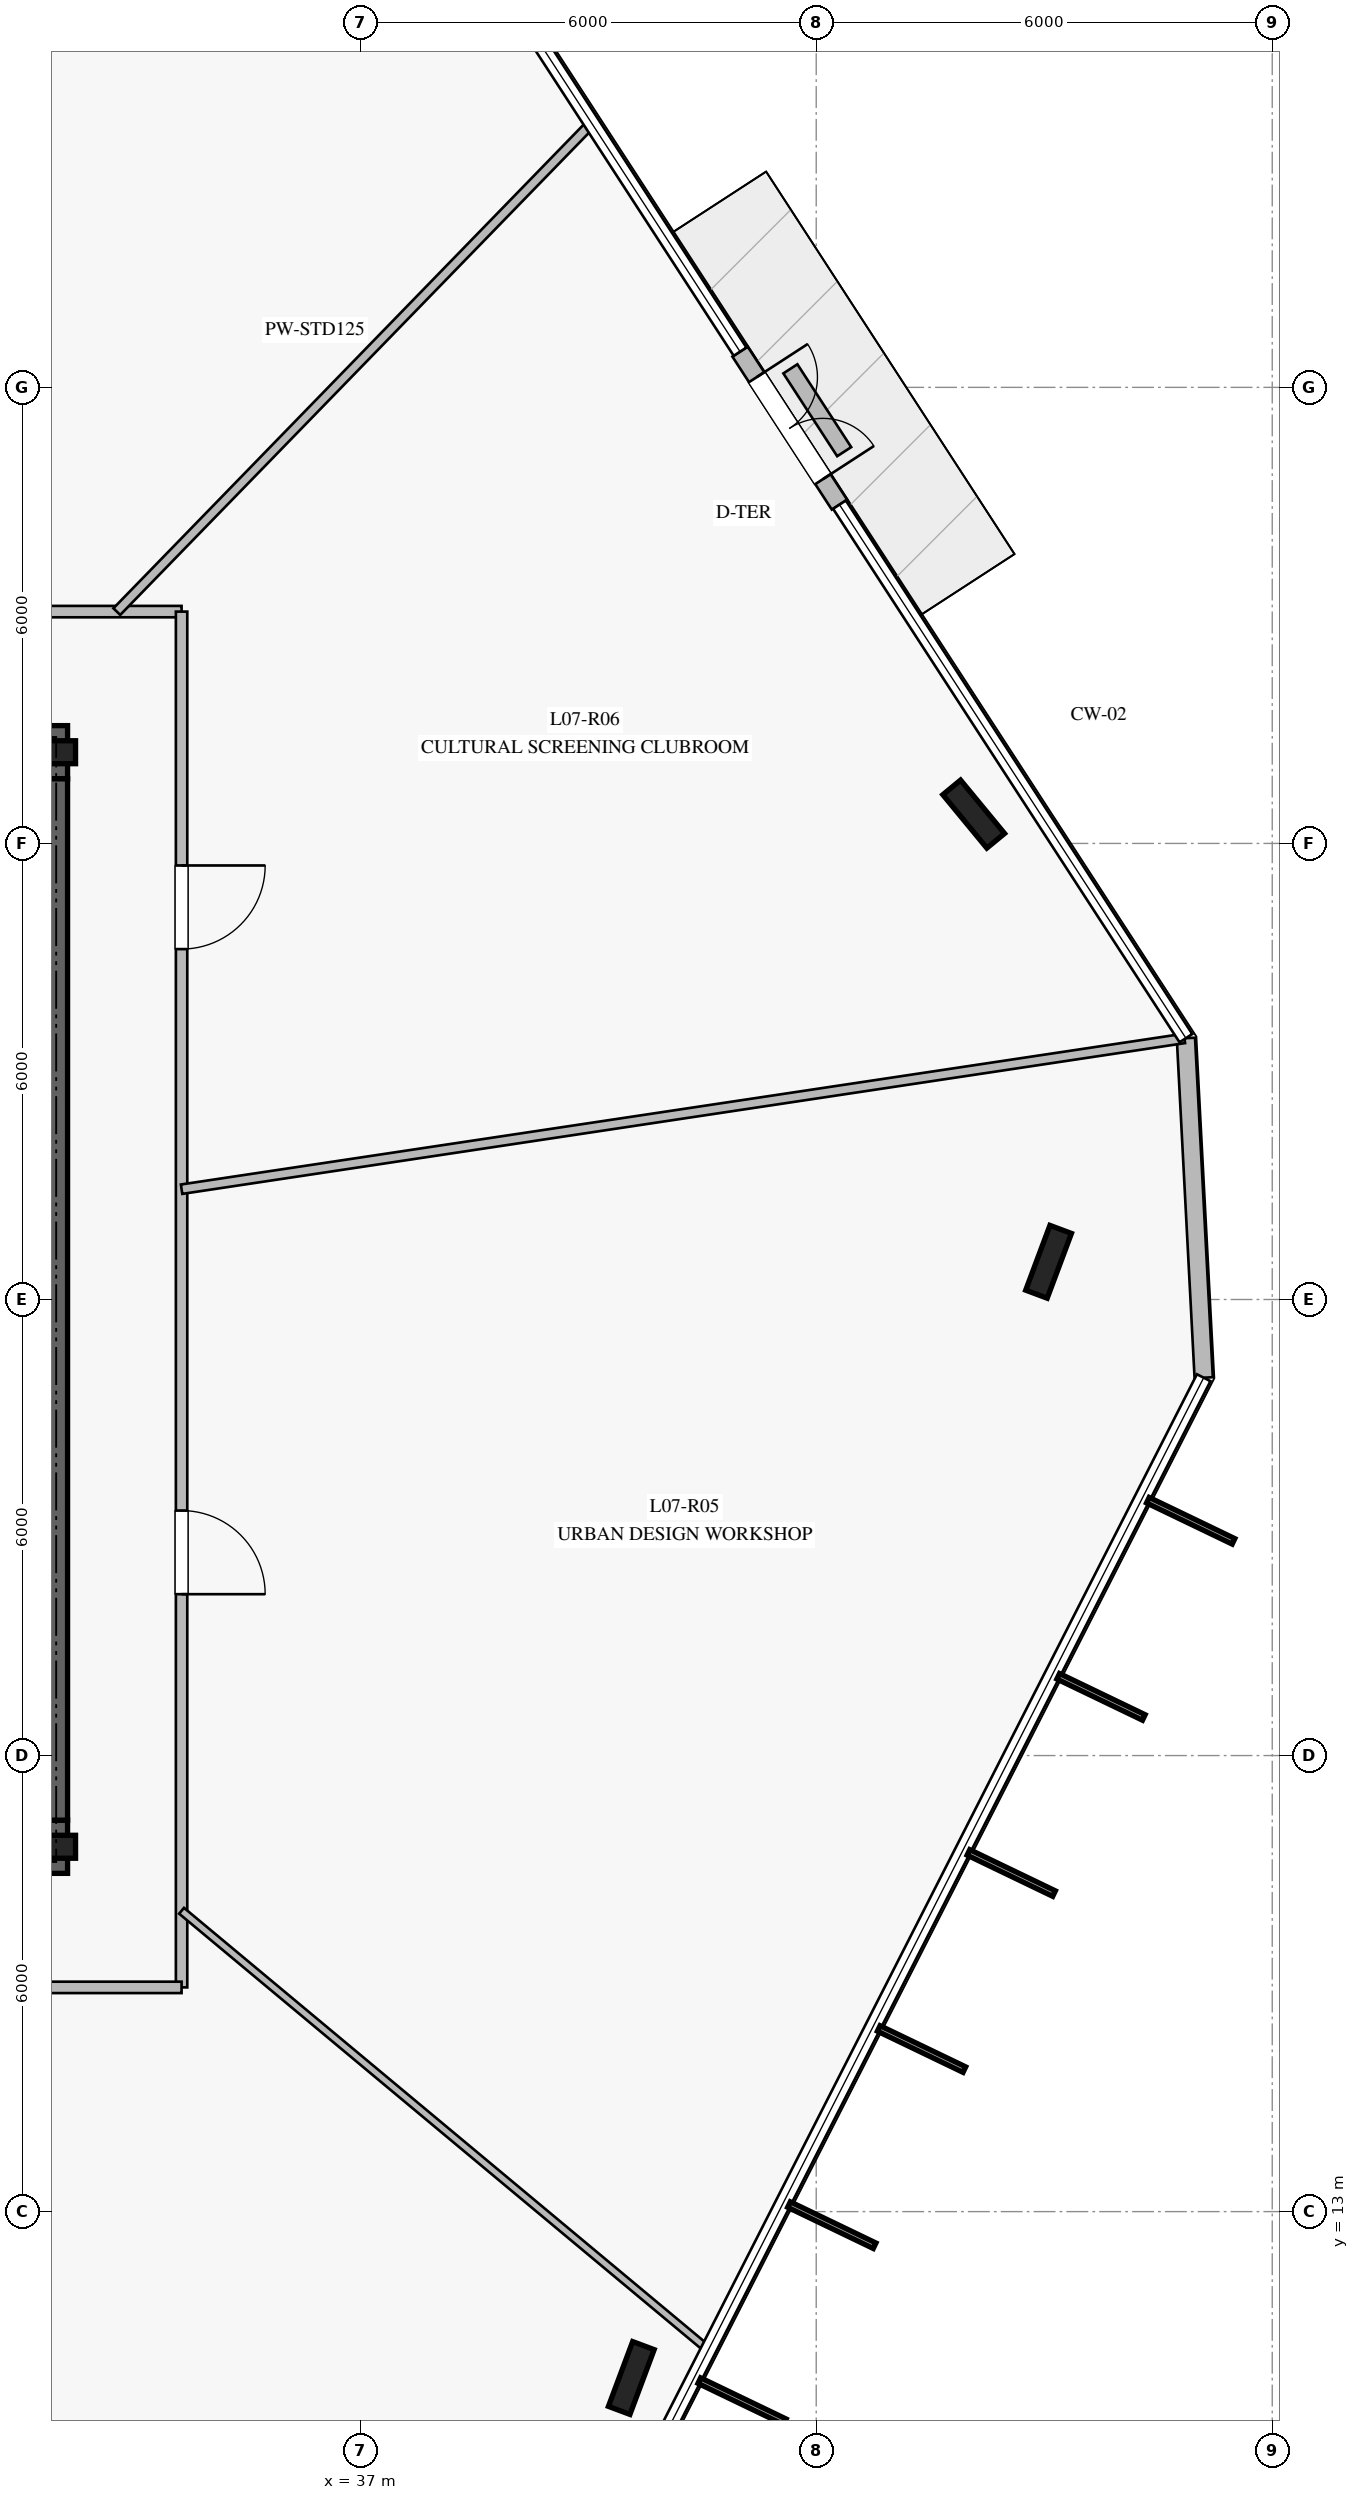
"""IFC4 building model, lengths in metres.
Left out: names, types, materials, properties, quantities, classifications, styles, units other than length and angle.
Written with IfcOpenShell. Run it as: python <this file> out.ifc"""

import sys

from ifc_helpers import new_model, si_unit, direction, frame, frame_2d, origin, origin_2d, place, context, subcontext, project, spatial, rectangle, i_section, extrude, element, fill, save


model = new_model("IFC4")
c1 = context("Model", 3, precision=1e-05, world=origin(), true_north=direction((0.0, 1.0)))
c2 = subcontext(c1, "Body", "Model", "MODEL_VIEW")
j1 = project(units=[si_unit("LENGTHUNIT", "METRE"), si_unit("PLANEANGLEUNIT", "RADIAN")], contexts=[c1])
p1 = place(None, origin())
s1 = spatial("IfcSite", under=j1, at=p1, CompositionType="ELEMENT")
p2 = place(p1, origin())
s2 = spatial("IfcBuilding", under=s1, at=p2, CompositionType="ELEMENT")
p3 = place(p2, frame((0.0, 0.0, 32.0)))
s3 = spatial("IfcBuildingStorey", under=s2, at=p3, CompositionType="ELEMENT", Elevation=32.0)
p4 = place(p3, frame((16.85, 17.8, 0.0), z_axis=(0.0, 0.0, 1.0), x_axis=(1.0, 0.0, 0.0)))
e1 = element("IfcWall", 1, at=p4, inside=s3, PredefinedType="SHEAR", context=c2, shape_type="SweptSolid", body=[
    extrude(rectangle(XDim=16.3, YDim=0.7, at=frame_2d((8.15, 0.0))), origin(), (0.0, 0.0, 1.0), 3.76),
])
p5 = place(p4, frame((5.1, 0.0, 0.0)))
e2 = element("IfcOpeningElement", 2, at=p5, cuts=e1, PredefinedType="OPENING", context=c2, shape_type="SweptSolid", body=[
    extrude(rectangle(XDim=1.2, YDim=2.25, at=frame_2d((0.6, 1.125))), frame((0.0, 0.36, 0.0), z_axis=(0.0, -1.0, 0.0), x_axis=(1.0, 0.0, 0.0)), (0.0, 0.0, 1.0), 0.72),
])
p6 = place(p4, frame((14.05, 0.0, 0.0)))
e3 = element("IfcOpeningElement", 3, at=p6, cuts=e1, PredefinedType="OPENING", context=c2, shape_type="SweptSolid", body=[
    extrude(rectangle(XDim=0.9, YDim=2.1, at=frame_2d((0.45, 1.05))), frame((0.0, 0.36, 0.0), z_axis=(0.0, -1.0, 0.0), x_axis=(1.0, 0.0, 0.0)), (0.0, 0.0, 1.0), 0.72),
])
p7 = place(p4, frame((7.95, 0.0, 0.0)))
e4 = element("IfcOpeningElement", 4, at=p7, cuts=e1, PredefinedType="OPENING", context=c2, shape_type="SweptSolid", body=[
    extrude(rectangle(XDim=1.1, YDim=2.2, at=frame_2d((0.55, 1.1))), frame((0.0, 0.36, 0.0), z_axis=(0.0, -1.0, 0.0), x_axis=(1.0, 0.0, 0.0)), (0.0, 0.0, 1.0), 0.72),
])
p8 = place(p4, frame((9.925, 0.0, 0.0)))
e5 = element("IfcOpeningElement", 5, at=p8, cuts=e1, PredefinedType="OPENING", context=c2, shape_type="SweptSolid", body=[
    extrude(rectangle(XDim=1.1, YDim=2.2, at=frame_2d((0.55, 1.1))), frame((0.0, 0.36, 0.0), z_axis=(0.0, -1.0, 0.0), x_axis=(1.0, 0.0, 0.0)), (0.0, 0.0, 1.0), 0.72),
])
p9 = place(p4, frame((11.9, 0.0, 0.0)))
e6 = element("IfcOpeningElement", 6, at=p9, cuts=e1, PredefinedType="OPENING", context=c2, shape_type="SweptSolid", body=[
    extrude(rectangle(XDim=1.1, YDim=2.2, at=frame_2d((0.55, 1.1))), frame((0.0, 0.36, 0.0), z_axis=(0.0, -1.0, 0.0), x_axis=(1.0, 0.0, 0.0)), (0.0, 0.0, 1.0), 0.72),
])
p10 = place(p3, frame((33.15, 32.2, 0.0), z_axis=(0.0, 0.0, 1.0), x_axis=(-1.0, 0.0, 0.0)))
e7 = element("IfcWall", 7, at=p10, inside=s3, PredefinedType="SHEAR", context=c2, shape_type="SweptSolid", body=[
    extrude(rectangle(XDim=16.3, YDim=0.7, at=frame_2d((8.15, 0.0))), origin(), (0.0, 0.0, 1.0), 3.76),
])
p11 = place(p10, frame((5.1, 0.0, 0.0)))
e8 = element("IfcOpeningElement", 8, at=p11, cuts=e7, PredefinedType="OPENING", context=c2, shape_type="SweptSolid", body=[
    extrude(rectangle(XDim=1.2, YDim=2.25, at=frame_2d((0.6, 1.125))), frame((0.0, 0.36, 0.0), z_axis=(0.0, -1.0, 0.0), x_axis=(1.0, 0.0, 0.0)), (0.0, 0.0, 1.0), 0.72),
])
p12 = place(p3, frame((32.8, 18.15, 0.0), z_axis=(0.0, 0.0, 1.0), x_axis=(0.0, 1.0, 0.0)))
e9 = element("IfcWall", 9, at=p12, inside=s3, PredefinedType="SHEAR", context=c2, shape_type="SweptSolid", body=[
    extrude(rectangle(XDim=13.7, YDim=0.7, at=frame_2d((6.85, 0.0))), origin(), (0.0, 0.0, 1.0), 3.76),
])
for number, where, z_axis, x_axis in (
    (10, (45.072, 31.386, 0.0), (0.0, 0.0, 1.0), (-0.636, 0.772, 0.0)),
    (11, (40.567, 10.811, 0.0), (0.0, 0.0, 1.0), (0.35, 0.937, 0.0)),
    (12, (46.057, 25.496, 0.0), (0.0, 0.0, 1.0), (0.35, 0.937, 0.0)),
):
    element("IfcColumn", number, at=place(p3, frame(where, z_axis=z_axis, x_axis=x_axis)), inside=s3, PredefinedType="COLUMN", context=c2, shape_type="SweptSolid", body=[
        extrude(i_section(OverallWidth=0.302, OverallDepth=0.91, WebThickness=0.021, FlangeThickness=0.04, at=origin_2d()), origin(), (0.0, 0.0, 1.0), 4.0),
    ])
p13 = place(p3, frame((43.306, 35.457, 0.0), z_axis=(0.0, 0.0, 1.0), x_axis=(-0.54482747333, 0.838548164571, 0.0)))
e13 = element("IfcWall", 13, at=p13, inside=s3, PredefinedType="STANDARD", context=c2, shape_type="SweptSolid", body=[
    extrude(rectangle(XDim=2.4, YDim=0.24, at=frame_2d((1.2, 0.0))), origin(), (0.0, 0.0, 1.0), 3.76),
])
p14 = place(p13, frame((0.4, 0.0, 0.0)))
e14 = element("IfcOpeningElement", 14, at=p14, cuts=e13, PredefinedType="OPENING", context=c2, shape_type="SweptSolid", body=[
    extrude(rectangle(XDim=1.6, YDim=2.25, at=frame_2d((0.8, 1.125))), frame((0.0, 0.13, 0.0), z_axis=(0.0, -1.0, 0.0), x_axis=(1.0, 0.0, 0.0)), (0.0, 0.0, 1.0), 0.26),
])
p15 = place(p3, frame((48.098, 23.971, 0.0), z_axis=(0.0, 0.0, 1.0), x_axis=(-0.052286689983, 0.998632115471, 0.0)))
e15 = element("IfcWall", 15, at=p15, inside=s3, PredefinedType="STANDARD", context=c2, shape_type="SweptSolid", body=[
    extrude(rectangle(XDim=4.473, YDim=0.24, at=frame_2d((2.237, 0.0))), origin(), (0.0, 0.0, 1.0), 3.76),
])
p16 = place(p3, frame((43.368, 36.154, 0.0), z_axis=(0.0, 0.0, 1.0), x_axis=(-0.544777038638, 0.8385809312, 0.0)))
e16 = element("IfcWall", 16, at=p16, inside=s3, PredefinedType="USERDEFINED", context=c2, shape_type="SweptSolid", body=[
    extrude(rectangle(XDim=1.3, YDim=0.22, at=frame_2d((0.65, 0.0))), origin(), (0.0, 0.0, 1.0), 0.4),
])
p17 = place(p3, frame((15.35, 34.05, 0.0), z_axis=(0.0, 0.0, 1.0), x_axis=(1.0, 0.0, 0.0)))
e17 = element("IfcWall", 17, at=p17, inside=s3, PredefinedType="PARTITIONING", context=c2, shape_type="SweptSolid", body=[
    extrude(rectangle(XDim=19.3, YDim=0.15, at=frame_2d((9.65, 0.0))), origin(), (0.0, 0.0, 1.0), 3.21),
])
p18 = place(p17, frame((12.519, 0.0, 0.0)))
e18 = element("IfcOpeningElement", 18, at=p18, cuts=e17, PredefinedType="OPENING", context=c2, shape_type="SweptSolid", body=[
    extrude(rectangle(XDim=1.1, YDim=2.2, at=frame_2d((0.55, 1.1))), frame((0.0, 0.085, 0.0), z_axis=(0.0, -1.0, 0.0), x_axis=(1.0, 0.0, 0.0)), (0.0, 0.0, 1.0), 0.17),
])
p19 = place(p17, frame((3.519, 0.0, 0.0)))
e19 = element("IfcOpeningElement", 19, at=p19, cuts=e17, PredefinedType="OPENING", context=c2, shape_type="SweptSolid", body=[
    extrude(rectangle(XDim=1.1, YDim=2.2, at=frame_2d((0.55, 1.1))), frame((0.0, 0.085, 0.0), z_axis=(0.0, -1.0, 0.0), x_axis=(1.0, 0.0, 0.0)), (0.0, 0.0, 1.0), 0.17),
])
p20 = place(p3, frame((34.65, 34.05, 0.0), z_axis=(0.0, 0.0, 1.0), x_axis=(0.0, -1.0, 0.0)))
e20 = element("IfcWall", 20, at=p20, inside=s3, PredefinedType="PARTITIONING", context=c2, shape_type="SweptSolid", body=[
    extrude(rectangle(XDim=18.1, YDim=0.15, at=frame_2d((9.05, 0.0))), origin(), (0.0, 0.0, 1.0), 3.21),
])
p21 = place(p20, frame((11.827, 0.0, 0.0)))
e21 = element("IfcOpeningElement", 21, at=p21, cuts=e20, PredefinedType="OPENING", context=c2, shape_type="SweptSolid", body=[
    extrude(rectangle(XDim=1.1, YDim=2.2, at=frame_2d((0.55, 1.1))), frame((0.0, 0.085, 0.0), z_axis=(0.0, -1.0, 0.0), x_axis=(1.0, 0.0, 0.0)), (0.0, 0.0, 1.0), 0.17),
])
p22 = place(p20, frame((3.34, 0.0, 0.0)))
e22 = element("IfcOpeningElement", 22, at=p22, cuts=e20, PredefinedType="OPENING", context=c2, shape_type="SweptSolid", body=[
    extrude(rectangle(XDim=1.1, YDim=2.2, at=frame_2d((0.55, 1.1))), frame((0.0, 0.085, 0.0), z_axis=(0.0, -1.0, 0.0), x_axis=(1.0, 0.0, 0.0)), (0.0, 0.0, 1.0), 0.17),
])
p23 = place(p3, frame((34.65, 15.95, 0.0), z_axis=(0.0, 0.0, 1.0), x_axis=(-1.0, 0.0, 0.0)))
e23 = element("IfcWall", 23, at=p23, inside=s3, PredefinedType="PARTITIONING", context=c2, shape_type="SweptSolid", body=[
    extrude(rectangle(XDim=19.3, YDim=0.15, at=frame_2d((9.65, 0.0))), origin(), (0.0, 0.0, 1.0), 3.21),
])
p24 = place(p23, frame((14.102, 0.0, 0.0)))
e24 = element("IfcOpeningElement", 24, at=p24, cuts=e23, PredefinedType="OPENING", context=c2, shape_type="SweptSolid", body=[
    extrude(rectangle(XDim=1.1, YDim=2.2, at=frame_2d((0.55, 1.1))), frame((0.0, 0.085, 0.0), z_axis=(0.0, -1.0, 0.0), x_axis=(1.0, 0.0, 0.0)), (0.0, 0.0, 1.0), 0.17),
])
p25 = place(p23, frame((4.818, 0.0, 0.0)))
e25 = element("IfcOpeningElement", 25, at=p25, cuts=e23, PredefinedType="OPENING", context=c2, shape_type="SweptSolid", body=[
    extrude(rectangle(XDim=1.1, YDim=2.2, at=frame_2d((0.55, 1.1))), frame((0.0, 0.085, 0.0), z_axis=(0.0, -1.0, 0.0), x_axis=(1.0, 0.0, 0.0)), (0.0, 0.0, 1.0), 0.17),
])
p26 = place(p3, frame((33.798, 34.05, 0.0), z_axis=(0.0, 0.0, 1.0), x_axis=(0.697087358393, 0.716986202635, 0.0)))
e26 = element("IfcWall", 26, at=p26, inside=s3, PredefinedType="PARTITIONING", context=c2, shape_type="SweptSolid", body=[
    extrude(rectangle(XDim=8.944, YDim=0.125, at=frame_2d((4.472, 0.0))), origin(), (0.0, 0.0, 1.0), 3.05),
])
p27 = place(p3, frame((34.65, 16.958, 0.0), z_axis=(0.0, 0.0, 1.0), x_axis=(0.76818127449, -0.640232402744, 0.0)))
e27 = element("IfcWall", 27, at=p27, inside=s3, PredefinedType="MOVABLE", context=c2, shape_type="SweptSolid", body=[
    extrude(rectangle(XDim=9.004, YDim=0.1, at=frame_2d((4.502, 0.0))), origin(), (0.0, 0.0, 1.0), 3.06),
])
p28 = place(p3, frame((34.65, 26.451, 0.0), z_axis=(0.0, 0.0, 1.0), x_axis=(0.988881121933, 0.148708193067, 0.0)))
e28 = element("IfcWall", 28, at=p28, inside=s3, PredefinedType="PARTITIONING", context=c2, shape_type="SweptSolid", body=[
    extrude(rectangle(XDim=13.343, YDim=0.125, at=frame_2d((6.671, 0.0))), origin(), (0.0, 0.0, 1.0), 3.06),
])
p29 = place(p14, frame((1.6, 0.0, 0.0), z_axis=(0.0, 0.0, 1.0), x_axis=(-1.0, 0.0, 0.0)))
e29 = element("IfcDoor", 29, at=p29, inside=s3, OperationType="DOUBLE_DOOR_SINGLE_SWING", PredefinedType="DOOR", context=c2, shape_type="SweptSolid", body=[
    extrude(rectangle(XDim=1.6, YDim=2.25, at=frame_2d((0.8, 1.125))), frame((0.0, 0.025, 0.0), z_axis=(0.0, -1.0, 0.0), x_axis=(1.0, 0.0, 0.0)), (0.0, 0.0, 1.0), 0.05),
])
fill(e14, e29)
p30 = place(p21, origin())
e30 = element("IfcDoor", 30, at=p30, inside=s3, OperationType="SINGLE_SWING_RIGHT", PredefinedType="DOOR", context=c2, shape_type="SweptSolid", body=[
    extrude(rectangle(XDim=1.1, YDim=2.2, at=frame_2d((0.55, 1.1))), frame((0.0, 0.025, 0.0), z_axis=(0.0, -1.0, 0.0), x_axis=(1.0, 0.0, 0.0)), (0.0, 0.0, 1.0), 0.05),
])
fill(e21, e30)
p31 = place(p22, origin())
e31 = element("IfcDoor", 31, at=p31, inside=s3, OperationType="SINGLE_SWING_LEFT", PredefinedType="DOOR", context=c2, shape_type="SweptSolid", body=[
    extrude(rectangle(XDim=1.1, YDim=2.2, at=frame_2d((0.55, 1.1))), frame((0.0, 0.025, 0.0), z_axis=(0.0, -1.0, 0.0), x_axis=(1.0, 0.0, 0.0)), (0.0, 0.0, 1.0), 0.05),
])
fill(e22, e31)
save(model, sys.argv[1])
